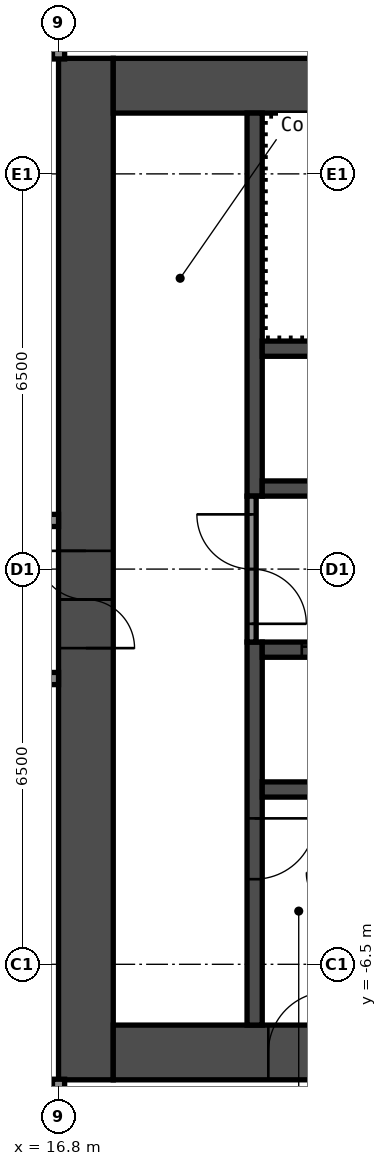
"""IFC4 building model, lengths in metres.
Left out: names, types, materials, properties, quantities, classifications, styles, units other than length and angle.
Written with IfcOpenShell. Run it as: python <this file> out.ifc"""

import sys

from ifc_helpers import new_model, si_unit, direction, frame, frame_2d, origin, place, context, subcontext, project, spatial, rectangle, extrude, element, fill, save


model = new_model("IFC4")
c1 = context("Model", 3, precision=1e-05, world=origin(), true_north=direction((0.0, 1.0)))
c2 = subcontext(c1, "Body", "Model", "MODEL_VIEW")
j1 = project(units=[si_unit("LENGTHUNIT", "METRE"), si_unit("PLANEANGLEUNIT", "RADIAN")], contexts=[c1])
p1 = place(None, origin())
s1 = spatial("IfcSite", under=j1, at=p1, CompositionType="ELEMENT")
p2 = place(p1, origin())
s2 = spatial("IfcBuilding", under=s1, at=p2, CompositionType="ELEMENT")
p3 = place(p2, frame((0.0, 0.0, 163.0)))
s3 = spatial("IfcBuildingStorey", under=s2, at=p3, CompositionType="ELEMENT", Elevation=163.0)
p4 = place(p3, frame((17.25, -8.4, 0.0), z_axis=(0.0, 0.0, 1.0), x_axis=(0.0, 1.0, 0.0)))
e1 = element("IfcWall", 1, at=p4, inside=s3, PredefinedType="SHEAR", context=c2, shape_type="SweptSolid", body=[
    extrude(rectangle(XDim=16.8, YDim=0.9, at=frame_2d((8.4, 0.0))), origin(), (0.0, 0.0, 1.0), 2.75),
])
p5 = place(p4, frame((7.1, 0.0, 0.0)))
e2 = element("IfcOpeningElement", 2, at=p5, cuts=e1, PredefinedType="OPENING", context=c2, shape_type="SweptSolid", body=[
    extrude(rectangle(XDim=1.6, YDim=2.1, at=frame_2d((0.8, 1.05))), frame((0.0, 0.46, 0.0), z_axis=(0.0, -1.0, 0.0), x_axis=(1.0, 0.0, 0.0)), (0.0, 0.0, 1.0), 0.92),
])
p6 = place(p3, frame((17.7, 7.95, 0.0), z_axis=(0.0, 0.0, 1.0), x_axis=(1.0, 0.0, 0.0)))
e3 = element("IfcWall", 3, at=p6, inside=s3, PredefinedType="SHEAR", context=c2, shape_type="SweptSolid", body=[
    extrude(rectangle(XDim=15.0, YDim=0.9, at=frame_2d((7.5, 0.0))), origin(), (0.0, 0.0, 1.0), 2.75),
])
p7 = place(p6, frame((10.4, 0.0, 0.0)))
e4 = element("IfcOpeningElement", 4, at=p7, cuts=e3, PredefinedType="OPENING", context=c2, shape_type="SweptSolid", body=[
    extrude(rectangle(XDim=1.2, YDim=2.1, at=frame_2d((0.6, 1.05))), frame((0.0, 0.46, 0.0), z_axis=(0.0, -1.0, 0.0), x_axis=(1.0, 0.0, 0.0)), (0.0, 0.0, 1.0), 0.92),
])
p8 = place(p6, frame((13.35, 0.0, 0.0)))
e5 = element("IfcOpeningElement", 5, at=p8, cuts=e3, PredefinedType="OPENING", context=c2, shape_type="SweptSolid", body=[
    extrude(rectangle(XDim=0.9, YDim=2.1, at=frame_2d((0.45, 1.05))), frame((0.0, 0.46, 0.0), z_axis=(0.0, -1.0, 0.0), x_axis=(1.0, 0.0, 0.0)), (0.0, 0.0, 1.0), 0.92),
])
p9 = place(p3, frame((17.7, -7.95, 0.0), z_axis=(0.0, 0.0, 1.0), x_axis=(1.0, 0.0, 0.0)))
e6 = element("IfcWall", 6, at=p9, inside=s3, PredefinedType="SHEAR", context=c2, shape_type="SweptSolid", body=[
    extrude(rectangle(XDim=15.0, YDim=0.9, at=frame_2d((7.5, 0.0))), origin(), (0.0, 0.0, 1.0), 2.75),
])
p10 = place(p9, frame((2.55, 0.0, 0.0)))
e7 = element("IfcOpeningElement", 7, at=p10, cuts=e6, PredefinedType="OPENING", context=c2, shape_type="SweptSolid", body=[
    extrude(rectangle(XDim=1.0, YDim=2.1, at=frame_2d((0.5, 1.05))), frame((0.0, 0.46, 0.0), z_axis=(0.0, -1.0, 0.0), x_axis=(1.0, 0.0, 0.0)), (0.0, 0.0, 1.0), 0.92),
])
p11 = place(p3, frame((20.025, 1.2, 0.0), z_axis=(0.0, 0.0, 1.0), x_axis=(0.0, 1.0, 0.0)))
e8 = element("IfcWall", 8, at=p11, inside=s3, PredefinedType="SHEAR", context=c2, shape_type="SweptSolid", body=[
    extrude(rectangle(XDim=6.3, YDim=0.25, at=frame_2d((3.15, 0.0))), origin(), (0.0, 0.0, 1.0), 2.75),
])
p12 = place(p3, frame((20.025, -7.5, 0.0), z_axis=(0.0, 0.0, 1.0), x_axis=(0.0, 1.0, 0.0)))
e9 = element("IfcWall", 9, at=p12, inside=s3, PredefinedType="SHEAR", context=c2, shape_type="SweptSolid", body=[
    extrude(rectangle(XDim=6.3, YDim=0.25, at=frame_2d((3.15, 0.0))), origin(), (0.0, 0.0, 1.0), 2.75),
])
p13 = place(p12, frame((2.4, 0.0, 0.0)))
e10 = element("IfcOpeningElement", 10, at=p13, cuts=e9, PredefinedType="OPENING", context=c2, shape_type="SweptSolid", body=[
    extrude(rectangle(XDim=1.0, YDim=2.1, at=frame_2d((0.5, 1.05))), frame((0.0, 0.135, 0.0), z_axis=(0.0, -1.0, 0.0), x_axis=(1.0, 0.0, 0.0)), (0.0, 0.0, 1.0), 0.27),
])
p14 = place(p3, frame((20.15, 1.325, 0.0), z_axis=(0.0, 0.0, 1.0), x_axis=(1.0, 0.0, 0.0)))
e11 = element("IfcWall", 11, at=p14, inside=s3, PredefinedType="SHEAR", context=c2, shape_type="SweptSolid", body=[
    extrude(rectangle(XDim=7.5, YDim=0.25, at=frame_2d((3.75, 0.0))), origin(), (0.0, 0.0, 1.0), 2.75),
])
p15 = place(p14, frame((3.175, 0.0, 0.0)))
e12 = element("IfcOpeningElement", 12, at=p15, cuts=e11, PredefinedType="OPENING", context=c2, shape_type="SweptSolid", body=[
    extrude(rectangle(XDim=0.9, YDim=2.1, at=frame_2d((0.45, 1.05))), frame((0.0, 0.135, 0.0), z_axis=(0.0, -1.0, 0.0), x_axis=(1.0, 0.0, 0.0)), (0.0, 0.0, 1.0), 0.27),
])
p16 = place(p3, frame((20.15, 3.625, 0.0), z_axis=(0.0, 0.0, 1.0), x_axis=(1.0, 0.0, 0.0)))
e13 = element("IfcWall", 13, at=p16, inside=s3, PredefinedType="SHEAR", context=c2, shape_type="SweptSolid", body=[
    extrude(rectangle(XDim=7.5, YDim=0.25, at=frame_2d((3.75, 0.0))), origin(), (0.0, 0.0, 1.0), 2.75),
])
p17 = place(p3, frame((20.15, -1.325, 0.0), z_axis=(0.0, 0.0, 1.0), x_axis=(1.0, 0.0, 0.0)))
e14 = element("IfcWall", 14, at=p17, inside=s3, PredefinedType="SHEAR", context=c2, shape_type="SweptSolid", body=[
    extrude(rectangle(XDim=7.5, YDim=0.25, at=frame_2d((3.75, 0.0))), origin(), (0.0, 0.0, 1.0), 2.75),
])
p18 = place(p17, frame((0.65, 0.0, 0.0)))
e15 = element("IfcOpeningElement", 15, at=p18, cuts=e14, PredefinedType="OPENING", context=c2, shape_type="SweptSolid", body=[
    extrude(rectangle(XDim=1.1, YDim=2.1, at=frame_2d((0.55, 1.05))), frame((0.0, 0.135, 0.0), z_axis=(0.0, -1.0, 0.0), x_axis=(1.0, 0.0, 0.0)), (0.0, 0.0, 1.0), 0.27),
])
p19 = place(p17, frame((3.05, 0.0, 0.0)))
e16 = element("IfcOpeningElement", 16, at=p19, cuts=e14, PredefinedType="OPENING", context=c2, shape_type="SweptSolid", body=[
    extrude(rectangle(XDim=1.1, YDim=2.1, at=frame_2d((0.55, 1.05))), frame((0.0, 0.135, 0.0), z_axis=(0.0, -1.0, 0.0), x_axis=(1.0, 0.0, 0.0)), (0.0, 0.0, 1.0), 0.27),
])
p20 = place(p17, frame((5.45, 0.0, 0.0)))
e17 = element("IfcOpeningElement", 17, at=p20, cuts=e14, PredefinedType="OPENING", context=c2, shape_type="SweptSolid", body=[
    extrude(rectangle(XDim=1.1, YDim=2.1, at=frame_2d((0.55, 1.05))), frame((0.0, 0.135, 0.0), z_axis=(0.0, -1.0, 0.0), x_axis=(1.0, 0.0, 0.0)), (0.0, 0.0, 1.0), 0.27),
])
p21 = place(p3, frame((20.15, -3.625, 0.0), z_axis=(0.0, 0.0, 1.0), x_axis=(1.0, 0.0, 0.0)))
e18 = element("IfcWall", 18, at=p21, inside=s3, PredefinedType="SHEAR", context=c2, shape_type="SweptSolid", body=[
    extrude(rectangle(XDim=7.5, YDim=0.25, at=frame_2d((3.75, 0.0))), origin(), (0.0, 0.0, 1.0), 2.75),
])
p22 = place(p3, frame((19.975, -1.2, 0.0), z_axis=(0.0, 0.0, 1.0), x_axis=(0.0, 1.0, 0.0)))
e19 = element("IfcWall", 19, at=p22, inside=s3, PredefinedType="PARTITIONING", context=c2, shape_type="SweptSolid", body=[
    extrude(rectangle(XDim=2.4, YDim=0.15, at=frame_2d((1.2, 0.0))), origin(), (0.0, 0.0, 1.0), 2.75),
])
p23 = place(p22, frame((0.3, 0.0, 0.0)))
e20 = element("IfcOpeningElement", 20, at=p23, cuts=e19, PredefinedType="OPENING", context=c2, shape_type="SweptSolid", body=[
    extrude(rectangle(XDim=1.8, YDim=2.1, at=frame_2d((0.9, 1.05))), frame((0.0, 0.085, 0.0), z_axis=(0.0, -1.0, 0.0), x_axis=(1.0, 0.0, 0.0)), (0.0, 0.0, 1.0), 0.17),
])
p24 = place(p3, frame((-16.8, -1.8, 0.0), z_axis=(0.0, 0.0, 1.0), x_axis=(1.0, 0.0, 0.0)))
e21 = element("IfcWall", 21, at=p24, inside=s3, PredefinedType="PARTITIONING", context=c2, shape_type="SweptSolid", body=[
    extrude(rectangle(XDim=33.6, YDim=0.2, at=frame_2d((16.8, 0.0))), origin(), (0.0, 0.0, 1.0), 2.75),
])
p25 = place(p24, frame((5.4, 0.0, 0.0)))
e22 = element("IfcOpeningElement", 22, at=p25, cuts=e21, PredefinedType="OPENING", context=c2, shape_type="SweptSolid", body=[
    extrude(rectangle(XDim=1.0, YDim=2.1, at=frame_2d((0.5, 1.05))), frame((0.0, 0.11, 0.0), z_axis=(0.0, -1.0, 0.0), x_axis=(1.0, 0.0, 0.0)), (0.0, 0.0, 1.0), 0.22),
])
p26 = place(p24, frame((10.385, 0.0, 0.0)))
e23 = element("IfcOpeningElement", 23, at=p26, cuts=e21, PredefinedType="OPENING", context=c2, shape_type="SweptSolid", body=[
    extrude(rectangle(XDim=0.9, YDim=2.1, at=frame_2d((0.45, 1.05))), frame((0.0, 0.11, 0.0), z_axis=(0.0, -1.0, 0.0), x_axis=(1.0, 0.0, 0.0)), (0.0, 0.0, 1.0), 0.22),
])
p27 = place(p24, frame((14.585, 0.0, 0.0)))
e24 = element("IfcOpeningElement", 24, at=p27, cuts=e21, PredefinedType="OPENING", context=c2, shape_type="SweptSolid", body=[
    extrude(rectangle(XDim=0.9, YDim=2.1, at=frame_2d((0.45, 1.05))), frame((0.0, 0.11, 0.0), z_axis=(0.0, -1.0, 0.0), x_axis=(1.0, 0.0, 0.0)), (0.0, 0.0, 1.0), 0.22),
])
p28 = place(p24, frame((22.2, 0.0, 0.0)))
e25 = element("IfcOpeningElement", 25, at=p28, cuts=e21, PredefinedType="OPENING", context=c2, shape_type="SweptSolid", body=[
    extrude(rectangle(XDim=1.0, YDim=2.1, at=frame_2d((0.5, 1.05))), frame((0.0, 0.11, 0.0), z_axis=(0.0, -1.0, 0.0), x_axis=(1.0, 0.0, 0.0)), (0.0, 0.0, 1.0), 0.22),
])
p29 = place(p24, frame((30.6, 0.0, 0.0)))
e26 = element("IfcOpeningElement", 26, at=p29, cuts=e21, PredefinedType="OPENING", context=c2, shape_type="SweptSolid", body=[
    extrude(rectangle(XDim=1.0, YDim=2.1, at=frame_2d((0.5, 1.05))), frame((0.0, 0.11, 0.0), z_axis=(0.0, -1.0, 0.0), x_axis=(1.0, 0.0, 0.0)), (0.0, 0.0, 1.0), 0.22),
])
p30 = place(p3, frame((-16.8, 0.8, 0.0), z_axis=(0.0, 0.0, 1.0), x_axis=(1.0, 0.0, 0.0)))
e27 = element("IfcWall", 27, at=p30, inside=s3, PredefinedType="PARTITIONING", context=c2, shape_type="SweptSolid", body=[
    extrude(rectangle(XDim=33.6, YDim=0.2, at=frame_2d((16.8, 0.0))), origin(), (0.0, 0.0, 1.0), 2.75),
])
p31 = place(p30, frame((5.4, 0.0, 0.0)))
e28 = element("IfcOpeningElement", 28, at=p31, cuts=e27, PredefinedType="OPENING", context=c2, shape_type="SweptSolid", body=[
    extrude(rectangle(XDim=1.0, YDim=2.1, at=frame_2d((0.5, 1.05))), frame((0.0, 0.11, 0.0), z_axis=(0.0, -1.0, 0.0), x_axis=(1.0, 0.0, 0.0)), (0.0, 0.0, 1.0), 0.22),
])
p32 = place(p30, frame((9.88, 0.0, 0.0)))
e29 = element("IfcOpeningElement", 29, at=p32, cuts=e27, PredefinedType="OPENING", context=c2, shape_type="SweptSolid", body=[
    extrude(rectangle(XDim=0.9, YDim=2.1, at=frame_2d((0.45, 1.05))), frame((0.0, 0.11, 0.0), z_axis=(0.0, -1.0, 0.0), x_axis=(1.0, 0.0, 0.0)), (0.0, 0.0, 1.0), 0.22),
])
p33 = place(p30, frame((14.08, 0.0, 0.0)))
e30 = element("IfcOpeningElement", 30, at=p33, cuts=e27, PredefinedType="OPENING", context=c2, shape_type="SweptSolid", body=[
    extrude(rectangle(XDim=0.9, YDim=2.1, at=frame_2d((0.45, 1.05))), frame((0.0, 0.11, 0.0), z_axis=(0.0, -1.0, 0.0), x_axis=(1.0, 0.0, 0.0)), (0.0, 0.0, 1.0), 0.22),
])
p34 = place(p30, frame((18.7, 0.0, 0.0)))
e31 = element("IfcOpeningElement", 31, at=p34, cuts=e27, PredefinedType="OPENING", context=c2, shape_type="SweptSolid", body=[
    extrude(rectangle(XDim=0.9, YDim=2.1, at=frame_2d((0.45, 1.05))), frame((0.0, 0.11, 0.0), z_axis=(0.0, -1.0, 0.0), x_axis=(1.0, 0.0, 0.0)), (0.0, 0.0, 1.0), 0.22),
])
p35 = place(p30, frame((22.9, 0.0, 0.0)))
e32 = element("IfcOpeningElement", 32, at=p35, cuts=e27, PredefinedType="OPENING", context=c2, shape_type="SweptSolid", body=[
    extrude(rectangle(XDim=0.9, YDim=2.1, at=frame_2d((0.45, 1.05))), frame((0.0, 0.11, 0.0), z_axis=(0.0, -1.0, 0.0), x_axis=(1.0, 0.0, 0.0)), (0.0, 0.0, 1.0), 0.22),
])
p36 = place(p30, frame((30.6, 0.0, 0.0)))
e33 = element("IfcOpeningElement", 33, at=p36, cuts=e27, PredefinedType="OPENING", context=c2, shape_type="SweptSolid", body=[
    extrude(rectangle(XDim=1.0, YDim=2.1, at=frame_2d((0.5, 1.05))), frame((0.0, 0.11, 0.0), z_axis=(0.0, -1.0, 0.0), x_axis=(1.0, 0.0, 0.0)), (0.0, 0.0, 1.0), 0.22),
])
p37 = place(p3, frame((16.8, -19.3, 0.0), z_axis=(0.0, 0.0, 1.0), x_axis=(0.0, 1.0, 0.0)))
e34 = element("IfcWall", 34, at=p37, inside=s3, PredefinedType="PARTITIONING", context=c2, shape_type="SweptSolid", body=[
    extrude(rectangle(XDim=10.91, YDim=0.2, at=frame_2d((5.455, 0.0))), origin(), (0.0, 0.0, 1.0), 2.75),
])
p38 = place(p3, frame((16.8, 8.39, 0.0), z_axis=(0.0, 0.0, 1.0), x_axis=(0.0, 1.0, 0.0)))
e35 = element("IfcWall", 35, at=p38, inside=s3, PredefinedType="PARTITIONING", context=c2, shape_type="SweptSolid", body=[
    extrude(rectangle(XDim=9.91, YDim=0.2, at=frame_2d((4.955, 0.0))), origin(), (0.0, 0.0, 1.0), 2.75),
])
p39 = place(p5, origin())
e36 = element("IfcDoor", 36, at=p39, inside=s3, OperationType="DOUBLE_DOOR_SINGLE_SWING", PredefinedType="DOOR", context=c2, shape_type="SweptSolid", body=[
    extrude(rectangle(XDim=1.6, YDim=2.1, at=frame_2d((0.8, 1.05))), frame((0.0, 0.025, 0.0), z_axis=(0.0, -1.0, 0.0), x_axis=(1.0, 0.0, 0.0)), (0.0, 0.0, 1.0), 0.05),
])
fill(e2, e36)
p40 = place(p10, origin())
e37 = element("IfcDoor", 37, at=p40, inside=s3, OperationType="SINGLE_SWING_LEFT", PredefinedType="DOOR", context=c2, shape_type="SweptSolid", body=[
    extrude(rectangle(XDim=1.0, YDim=2.1, at=frame_2d((0.5, 1.05))), frame((0.0, 0.025, 0.0), z_axis=(0.0, -1.0, 0.0), x_axis=(1.0, 0.0, 0.0)), (0.0, 0.0, 1.0), 0.05),
])
fill(e7, e37)
p41 = place(p13, origin())
e38 = element("IfcDoor", 38, at=p41, inside=s3, OperationType="SINGLE_SWING_RIGHT", PredefinedType="DOOR", context=c2, shape_type="SweptSolid", body=[
    extrude(rectangle(XDim=1.0, YDim=2.1, at=frame_2d((0.5, 1.05))), frame((0.0, 0.025, 0.0), z_axis=(0.0, -1.0, 0.0), x_axis=(1.0, 0.0, 0.0)), (0.0, 0.0, 1.0), 0.05),
])
fill(e10, e38)
p42 = place(p23, origin())
e39 = element("IfcDoor", 39, at=p42, inside=s3, OperationType="DOUBLE_DOOR_SINGLE_SWING", PredefinedType="DOOR", context=c2, shape_type="SweptSolid", body=[
    extrude(rectangle(XDim=1.8, YDim=2.1, at=frame_2d((0.9, 1.05))), frame((0.0, 0.025, 0.0), z_axis=(0.0, -1.0, 0.0), x_axis=(1.0, 0.0, 0.0)), (0.0, 0.0, 1.0), 0.05),
])
fill(e20, e39)
p43 = place(p18, origin())
e40 = element("IfcDoor", 40, at=p43, inside=s3, OperationType="DOUBLE_DOOR_SLIDING", PredefinedType="DOOR", context=c2, shape_type="SweptSolid", body=[
    extrude(rectangle(XDim=1.1, YDim=2.1, at=frame_2d((0.55, 1.05))), frame((0.0, 0.025, 0.0), z_axis=(0.0, -1.0, 0.0), x_axis=(1.0, 0.0, 0.0)), (0.0, 0.0, 1.0), 0.05),
])
fill(e15, e40)
save(model, sys.argv[1])
